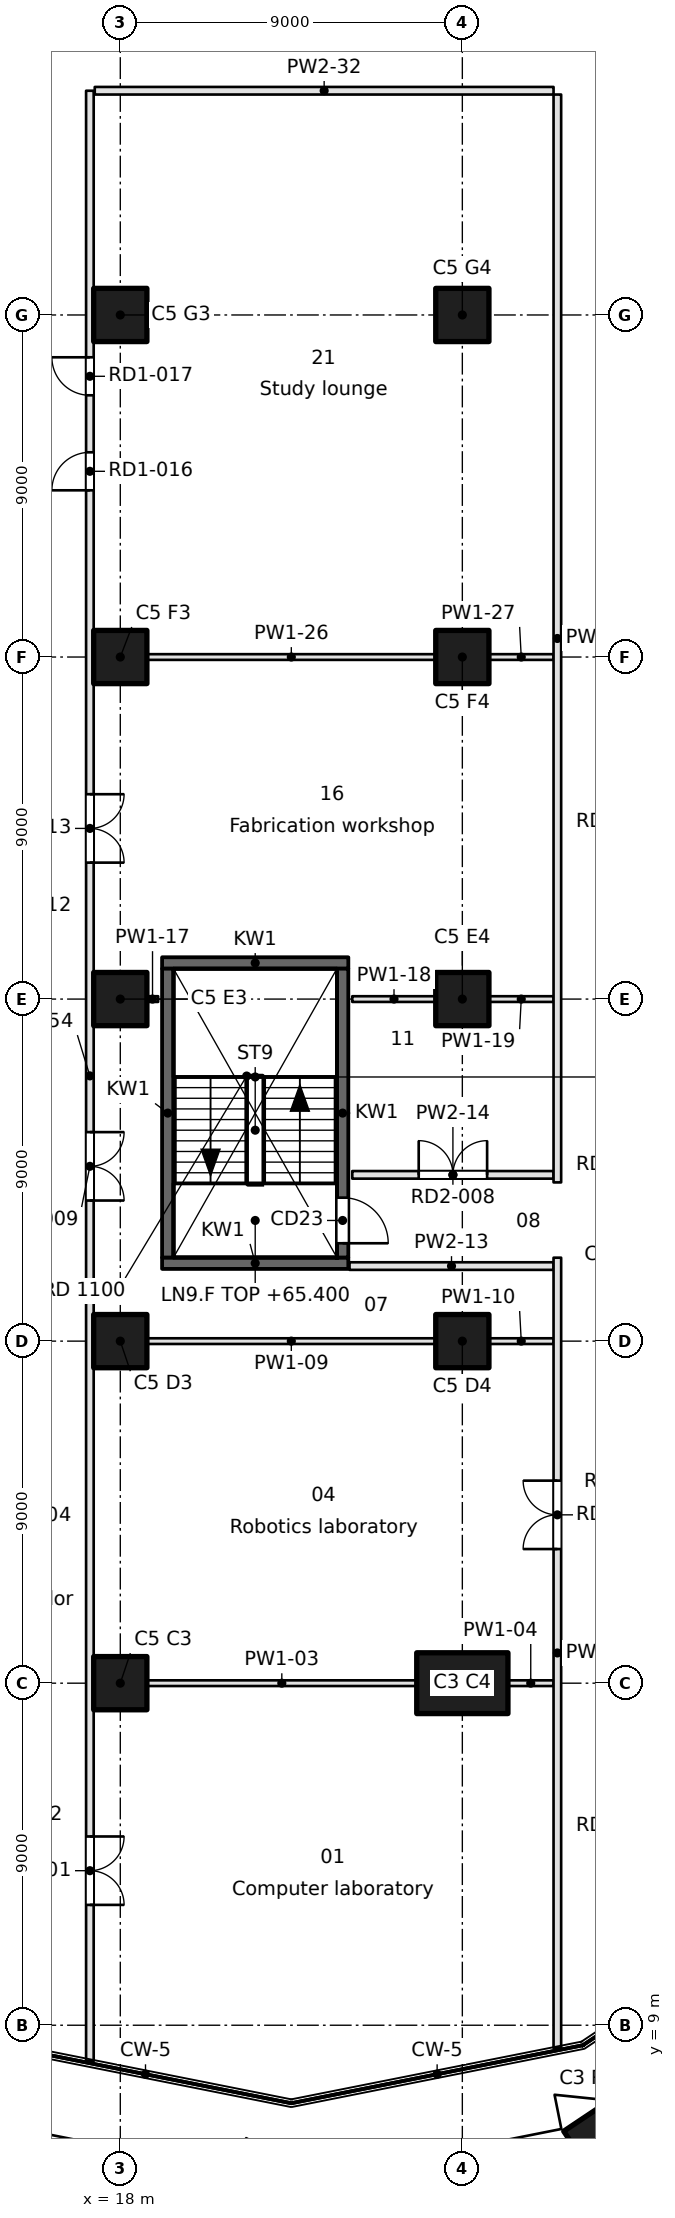
"""IFC4 building model, lengths in metres.
Left out: names, types, materials, properties, quantities, classifications, styles, units other than length and angle.
Written with IfcOpenShell. Run it as: python <this file> out.ifc"""

import sys

from ifc_helpers import new_model, si_unit, direction, frame, frame_2d, origin, origin_2d, place, context, subcontext, project, spatial, rectangle, extrude, element, fill, save


model = new_model("IFC4")
c1 = context("Model", 3, precision=1e-05, world=origin(), true_north=direction((0.0, 1.0)))
c2 = subcontext(c1, "Body", "Model", "MODEL_VIEW")
j1 = project(units=[si_unit("LENGTHUNIT", "METRE"), si_unit("PLANEANGLEUNIT", "RADIAN")], contexts=[c1])
p1 = place(None, origin())
s1 = spatial("IfcSite", under=j1, at=p1, CompositionType="ELEMENT")
p2 = place(p1, origin())
s2 = spatial("IfcBuilding", under=s1, at=p2, CompositionType="ELEMENT")
p3 = place(p2, frame((0.0, 0.0, 65.4)))
s3 = spatial("IfcBuildingStorey", under=s2, at=p3, CompositionType="ELEMENT", Elevation=65.4)
p4 = place(p3, frame((31.11, 6.213, 0.0), z_axis=(0.0, 0.0, 1.0), x_axis=(0.831469612303, 0.55557023302, 0.0)))
e1 = element("IfcColumn", 1, at=p4, inside=s3, PredefinedType="COLUMN", context=c2, shape_type="SweptSolid", body=[
    extrude(rectangle(XDim=2.4, YDim=1.6, at=origin_2d()), origin(), (0.0, 0.0, 1.0), 3.7),
])
for number, where, z_axis, x_axis in (
    (2, (18.0, 18.0, 0.0), (0.0, 0.0, 1.0), (1.0, 0.0, 0.0)),
    (3, (18.0, 27.0, 0.0), (0.0, 0.0, 1.0), (1.0, 0.0, 0.0)),
    (4, (18.0, 36.0, 0.0), (0.0, 0.0, 1.0), (1.0, 0.0, 0.0)),
    (5, (18.0, 45.0, 0.0), (0.0, 0.0, 1.0), (1.0, 0.0, 0.0)),
    (6, (18.0, 54.0, 0.0), (0.0, 0.0, 1.0), (1.0, 0.0, 0.0)),
):
    element("IfcColumn", number, at=place(p3, frame(where, z_axis=z_axis, x_axis=x_axis)), inside=s3, PredefinedType="COLUMN", context=c2, shape_type="SweptSolid", body=[
        extrude(rectangle(XDim=1.4, YDim=1.4, at=origin_2d()), origin(), (0.0, 0.0, 1.0), 3.7),
    ])
p5 = place(p3, frame((27.0, 18.0, 0.0), z_axis=(0.0, 0.0, 1.0), x_axis=(1.0, 0.0, 0.0)))
e7 = element("IfcColumn", 7, at=p5, inside=s3, PredefinedType="COLUMN", context=c2, shape_type="SweptSolid", body=[
    extrude(rectangle(XDim=2.4, YDim=1.6, at=origin_2d()), origin(), (0.0, 0.0, 1.0), 3.7),
])
for number, where, z_axis, x_axis in (
    (8, (27.0, 27.0, 0.0), (0.0, 0.0, 1.0), (1.0, 0.0, 0.0)),
    (9, (27.0, 36.0, 0.0), (0.0, 0.0, 1.0), (1.0, 0.0, 0.0)),
    (10, (27.0, 45.0, 0.0), (0.0, 0.0, 1.0), (1.0, 0.0, 0.0)),
    (11, (27.0, 54.0, 0.0), (0.0, 0.0, 1.0), (1.0, 0.0, 0.0)),
):
    element("IfcColumn", number, at=place(p3, frame(where, z_axis=z_axis, x_axis=x_axis)), inside=s3, PredefinedType="COLUMN", context=c2, shape_type="SweptSolid", body=[
        extrude(rectangle(XDim=1.4, YDim=1.4, at=origin_2d()), origin(), (0.0, 0.0, 1.0), 3.7),
    ])
for number, where, z_axis, x_axis in (
    (12, (19.1, 29.05, -0.4), (0.0, 0.0, 1.0), (1.0, 0.0, 0.0)),
    (13, (19.1, 36.95, -0.4), (0.0, 0.0, 1.0), (1.0, 0.0, 0.0)),
):
    element("IfcWall", number, at=place(p3, frame(where, z_axis=z_axis, x_axis=x_axis)), inside=s3, PredefinedType="SOLIDWALL", context=c2, shape_type="SweptSolid", body=[
        extrude(rectangle(XDim=4.9, YDim=0.3, at=frame_2d((2.45, 0.0))), origin(), (0.0, 0.0, 1.0), 3.7),
    ])
p6 = place(p3, frame((19.25, 29.2, -0.4), z_axis=(0.0, 0.0, 1.0), x_axis=(0.0, 1.0, 0.0)))
e14 = element("IfcWall", 14, at=p6, inside=s3, PredefinedType="SOLIDWALL", context=c2, shape_type="SweptSolid", body=[
    extrude(rectangle(XDim=7.6, YDim=0.3, at=frame_2d((3.8, 0.0))), origin(), (0.0, 0.0, 1.0), 3.7),
])
p7 = place(p3, frame((23.85, 29.2, -0.4), z_axis=(0.0, 0.0, 1.0), x_axis=(0.0, 1.0, 0.0)))
e15 = element("IfcWall", 15, at=p7, inside=s3, PredefinedType="SOLIDWALL", context=c2, shape_type="SweptSolid", body=[
    extrude(rectangle(XDim=7.6, YDim=0.3, at=frame_2d((3.8, 0.0))), origin(), (0.0, 0.0, 1.0), 3.7),
])
p8 = place(p7, frame((0.375, 0.0, 0.4)))
e16 = element("IfcOpeningElement", 16, at=p8, cuts=e15, PredefinedType="OPENING", context=c2, shape_type="SweptSolid", body=[
    extrude(rectangle(XDim=1.2, YDim=2.1, at=frame_2d((0.6, 1.05))), frame((0.0, 0.15, 0.0), z_axis=(0.0, -1.0, 0.0), x_axis=(1.0, 0.0, 0.0)), (0.0, 0.0, 1.0), 0.3),
])
p9 = place(p3, frame((18.7, 18.0, 0.0), z_axis=(0.0, 0.0, 1.0), x_axis=(1.0, 0.0, 0.0)))
e17 = element("IfcWall", 17, at=p9, inside=s3, PredefinedType="PARTITIONING", context=c2, shape_type="SweptSolid", body=[
    extrude(rectangle(XDim=7.1, YDim=0.15, at=frame_2d((3.55, 0.0))), origin(), (0.0, 0.0, 1.0), 3.3),
])
p10 = place(p3, frame((28.2, 18.0, 0.0), z_axis=(0.0, 0.0, 1.0), x_axis=(1.0, 0.0, 0.0)))
e18 = element("IfcWall", 18, at=p10, inside=s3, PredefinedType="PARTITIONING", context=c2, shape_type="SweptSolid", body=[
    extrude(rectangle(XDim=1.2, YDim=0.15, at=frame_2d((0.6, 0.0))), origin(), (0.0, 0.0, 1.0), 3.3),
])
p11 = place(p3, frame((18.7, 27.0, 0.0), z_axis=(0.0, 0.0, 1.0), x_axis=(1.0, 0.0, 0.0)))
e19 = element("IfcWall", 19, at=p11, inside=s3, PredefinedType="PARTITIONING", context=c2, shape_type="SweptSolid", body=[
    extrude(rectangle(XDim=7.6, YDim=0.15, at=frame_2d((3.8, 0.0))), origin(), (0.0, 0.0, 1.0), 3.3),
])
p12 = place(p3, frame((27.7, 27.0, 0.0), z_axis=(0.0, 0.0, 1.0), x_axis=(1.0, 0.0, 0.0)))
e20 = element("IfcWall", 20, at=p12, inside=s3, PredefinedType="PARTITIONING", context=c2, shape_type="SweptSolid", body=[
    extrude(rectangle(XDim=1.7, YDim=0.15, at=frame_2d((0.85, 0.0))), origin(), (0.0, 0.0, 1.0), 3.3),
])
p13 = place(p3, frame((29.4, 28.975, 0.0), z_axis=(0.0, 0.0, 1.0), x_axis=(-1.0, 0.0, 0.0)))
e21 = element("IfcWall", 21, at=p13, inside=s3, PredefinedType="PARTITIONING", context=c2, shape_type="SweptSolid", body=[
    extrude(rectangle(XDim=5.37, YDim=0.2, at=frame_2d((2.685, 0.0))), origin(), (0.0, 0.0, 1.0), 3.3),
])
p14 = place(p3, frame((24.104, 31.375, 0.0), z_axis=(0.0, 0.0, 1.0), x_axis=(1.0, 0.0, 0.0)))
e22 = element("IfcWall", 22, at=p14, inside=s3, PredefinedType="PARTITIONING", context=c2, shape_type="SweptSolid", body=[
    extrude(rectangle(XDim=5.296, YDim=0.2, at=frame_2d((2.648, 0.0))), origin(), (0.0, 0.0, 1.0), 3.3),
])
p15 = place(p14, frame((1.748, 0.0, 0.0)))
e23 = element("IfcOpeningElement", 23, at=p15, cuts=e22, PredefinedType="OPENING", context=c2, shape_type="SweptSolid", body=[
    extrude(rectangle(XDim=1.8, YDim=2.1, at=frame_2d((0.9, 1.05))), frame((0.0, 0.1, 0.0), z_axis=(0.0, -1.0, 0.0), x_axis=(1.0, 0.0, 0.0)), (0.0, 0.0, 1.0), 0.2),
])
p16 = place(p3, frame((18.7, 36.0, 0.0), z_axis=(0.0, 0.0, 1.0), x_axis=(1.0, 0.0, 0.0)))
e24 = element("IfcWall", 24, at=p16, inside=s3, PredefinedType="PARTITIONING", context=c2, shape_type="SweptSolid", body=[
    extrude(rectangle(XDim=0.296, YDim=0.15, at=frame_2d((0.148, 0.0))), origin(), (0.0, 0.0, 1.0), 3.3),
])
p17 = place(p3, frame((24.104, 36.0, 0.0), z_axis=(0.0, 0.0, 1.0), x_axis=(1.0, 0.0, 0.0)))
e25 = element("IfcWall", 25, at=p17, inside=s3, PredefinedType="PARTITIONING", context=c2, shape_type="SweptSolid", body=[
    extrude(rectangle(XDim=2.196, YDim=0.15, at=frame_2d((1.098, 0.0))), origin(), (0.0, 0.0, 1.0), 3.3),
])
p18 = place(p3, frame((27.7, 36.0, 0.0), z_axis=(0.0, 0.0, 1.0), x_axis=(1.0, 0.0, 0.0)))
e26 = element("IfcWall", 26, at=p18, inside=s3, PredefinedType="PARTITIONING", context=c2, shape_type="SweptSolid", body=[
    extrude(rectangle(XDim=1.7, YDim=0.15, at=frame_2d((0.85, 0.0))), origin(), (0.0, 0.0, 1.0), 3.3),
])
p19 = place(p3, frame((18.7, 45.0, 0.0), z_axis=(0.0, 0.0, 1.0), x_axis=(1.0, 0.0, 0.0)))
e27 = element("IfcWall", 27, at=p19, inside=s3, PredefinedType="PARTITIONING", context=c2, shape_type="SweptSolid", body=[
    extrude(rectangle(XDim=7.6, YDim=0.15, at=frame_2d((3.8, 0.0))), origin(), (0.0, 0.0, 1.0), 3.3),
])
p20 = place(p3, frame((27.7, 45.0, 0.0), z_axis=(0.0, 0.0, 1.0), x_axis=(1.0, 0.0, 0.0)))
e28 = element("IfcWall", 28, at=p20, inside=s3, PredefinedType="PARTITIONING", context=c2, shape_type="SweptSolid", body=[
    extrude(rectangle(XDim=1.7, YDim=0.15, at=frame_2d((0.85, 0.0))), origin(), (0.0, 0.0, 1.0), 3.3),
])
p21 = place(p3, frame((29.4, 59.9, 0.0), z_axis=(0.0, 0.0, 1.0), x_axis=(-1.0, 0.0, 0.0)))
e29 = element("IfcWall", 29, at=p21, inside=s3, PredefinedType="PARTITIONING", context=c2, shape_type="SweptSolid", body=[
    extrude(rectangle(XDim=12.072, YDim=0.2, at=frame_2d((6.036, 0.0))), origin(), (0.0, 0.0, 1.0), 3.3),
])
p22 = place(p3, frame((17.2, 59.9, 0.0), z_axis=(0.0, 0.0, 1.0), x_axis=(0.0, -1.0, 0.0)))
e30 = element("IfcWall", 30, at=p22, inside=s3, PredefinedType="PARTITIONING", context=c2, shape_type="SweptSolid", body=[
    extrude(rectangle(XDim=51.843, YDim=0.2, at=frame_2d((25.921, 0.0))), origin(), (0.0, 0.0, 1.0), 3.3),
])
p23 = place(p22, frame((45.934, 0.0, 0.0)))
e31 = element("IfcOpeningElement", 31, at=p23, cuts=e30, PredefinedType="OPENING", context=c2, shape_type="SweptSolid", body=[
    extrude(rectangle(XDim=1.8, YDim=2.1, at=frame_2d((0.9, 1.05))), frame((0.0, 0.1, 0.0), z_axis=(0.0, -1.0, 0.0), x_axis=(1.0, 0.0, 0.0)), (0.0, 0.0, 1.0), 0.2),
])
p24 = place(p22, frame((27.401, 0.0, 0.0)))
e32 = element("IfcOpeningElement", 32, at=p24, cuts=e30, PredefinedType="OPENING", context=c2, shape_type="SweptSolid", body=[
    extrude(rectangle(XDim=1.8, YDim=2.1, at=frame_2d((0.9, 1.05))), frame((0.0, 0.1, 0.0), z_axis=(0.0, -1.0, 0.0), x_axis=(1.0, 0.0, 0.0)), (0.0, 0.0, 1.0), 0.2),
])
p25 = place(p22, frame((18.51, 0.0, 0.0)))
e33 = element("IfcOpeningElement", 33, at=p25, cuts=e30, PredefinedType="OPENING", context=c2, shape_type="SweptSolid", body=[
    extrude(rectangle(XDim=1.8, YDim=2.1, at=frame_2d((0.9, 1.05))), frame((0.0, 0.1, 0.0), z_axis=(0.0, -1.0, 0.0), x_axis=(1.0, 0.0, 0.0)), (0.0, 0.0, 1.0), 0.2),
])
p26 = place(p22, frame((9.513, 0.0, 0.0)))
e34 = element("IfcOpeningElement", 34, at=p26, cuts=e30, PredefinedType="OPENING", context=c2, shape_type="SweptSolid", body=[
    extrude(rectangle(XDim=1.0, YDim=2.1, at=frame_2d((0.5, 1.05))), frame((0.0, 0.1, 0.0), z_axis=(0.0, -1.0, 0.0), x_axis=(1.0, 0.0, 0.0)), (0.0, 0.0, 1.0), 0.2),
])
p27 = place(p22, frame((7.013, 0.0, 0.0)))
e35 = element("IfcOpeningElement", 35, at=p27, cuts=e30, PredefinedType="OPENING", context=c2, shape_type="SweptSolid", body=[
    extrude(rectangle(XDim=1.0, YDim=2.1, at=frame_2d((0.5, 1.05))), frame((0.0, 0.1, 0.0), z_axis=(0.0, -1.0, 0.0), x_axis=(1.0, 0.0, 0.0)), (0.0, 0.0, 1.0), 0.2),
])
p28 = place(p3, frame((29.5, 8.396, 0.0), z_axis=(0.0, 0.0, 1.0), x_axis=(0.0, 1.0, 0.0)))
e36 = element("IfcWall", 36, at=p28, inside=s3, PredefinedType="PARTITIONING", context=c2, shape_type="SweptSolid", body=[
    extrude(rectangle(XDim=20.8, YDim=0.2, at=frame_2d((10.4, 0.0))), origin(), (0.0, 0.0, 1.0), 3.3),
])
p29 = place(p28, frame((13.134, 0.0, 0.0)))
e37 = element("IfcOpeningElement", 37, at=p29, cuts=e36, PredefinedType="OPENING", context=c2, shape_type="SweptSolid", body=[
    extrude(rectangle(XDim=1.8, YDim=2.1, at=frame_2d((0.9, 1.05))), frame((0.0, 0.1, 0.0), z_axis=(0.0, -1.0, 0.0), x_axis=(1.0, 0.0, 0.0)), (0.0, 0.0, 1.0), 0.2),
])
p30 = place(p3, frame((29.5, 31.176, 0.0), z_axis=(0.0, 0.0, 1.0), x_axis=(0.0, 1.0, 0.0)))
e38 = element("IfcWall", 38, at=p30, inside=s3, PredefinedType="PARTITIONING", context=c2, shape_type="SweptSolid", body=[
    extrude(rectangle(XDim=28.624, YDim=0.2, at=frame_2d((14.312, 0.0))), origin(), (0.0, 0.0, 1.0), 3.3),
])
p31 = place(p8, frame((1.2, 0.0, 0.0), z_axis=(0.0, 0.0, 1.0), x_axis=(-1.0, 0.0, 0.0)))
e39 = element("IfcDoor", 39, at=p31, inside=s3, OperationType="SINGLE_SWING_RIGHT", PredefinedType="DOOR", context=c2, shape_type="SweptSolid", body=[
    extrude(rectangle(XDim=1.2, YDim=2.1, at=frame_2d((0.6, 1.05))), frame((0.0, 0.025, 0.0), z_axis=(0.0, -1.0, 0.0), x_axis=(1.0, 0.0, 0.0)), (0.0, 0.0, 1.0), 0.05),
])
fill(e16, e39)
p32 = place(p23, origin())
e40 = element("IfcDoor", 40, at=p32, inside=s3, OperationType="DOUBLE_DOOR_SINGLE_SWING", PredefinedType="DOOR", context=c2, shape_type="SweptSolid", body=[
    extrude(rectangle(XDim=1.8, YDim=2.1, at=frame_2d((0.9, 1.05))), frame((0.0, 0.025, 0.0), z_axis=(0.0, -1.0, 0.0), x_axis=(1.0, 0.0, 0.0)), (0.0, 0.0, 1.0), 0.05),
])
fill(e31, e40)
p33 = place(p29, origin())
e41 = element("IfcDoor", 41, at=p33, inside=s3, OperationType="DOUBLE_DOOR_SINGLE_SWING", PredefinedType="DOOR", context=c2, shape_type="SweptSolid", body=[
    extrude(rectangle(XDim=1.8, YDim=2.1, at=frame_2d((0.9, 1.05))), frame((0.0, 0.025, 0.0), z_axis=(0.0, -1.0, 0.0), x_axis=(1.0, 0.0, 0.0)), (0.0, 0.0, 1.0), 0.05),
])
fill(e37, e41)
p34 = place(p15, origin())
e42 = element("IfcDoor", 42, at=p34, inside=s3, OperationType="DOUBLE_DOOR_SINGLE_SWING", PredefinedType="DOOR", context=c2, shape_type="SweptSolid", body=[
    extrude(rectangle(XDim=1.8, YDim=2.1, at=frame_2d((0.9, 1.05))), frame((0.0, 0.025, 0.0), z_axis=(0.0, -1.0, 0.0), x_axis=(1.0, 0.0, 0.0)), (0.0, 0.0, 1.0), 0.05),
])
fill(e23, e42)
p35 = place(p24, origin())
e43 = element("IfcDoor", 43, at=p35, inside=s3, OperationType="DOUBLE_DOOR_SINGLE_SWING", PredefinedType="DOOR", context=c2, shape_type="SweptSolid", body=[
    extrude(rectangle(XDim=1.8, YDim=2.1, at=frame_2d((0.9, 1.05))), frame((0.0, 0.025, 0.0), z_axis=(0.0, -1.0, 0.0), x_axis=(1.0, 0.0, 0.0)), (0.0, 0.0, 1.0), 0.05),
])
fill(e32, e43)
p36 = place(p25, origin())
e44 = element("IfcDoor", 44, at=p36, inside=s3, OperationType="DOUBLE_DOOR_SINGLE_SWING", PredefinedType="DOOR", context=c2, shape_type="SweptSolid", body=[
    extrude(rectangle(XDim=1.8, YDim=2.1, at=frame_2d((0.9, 1.05))), frame((0.0, 0.025, 0.0), z_axis=(0.0, -1.0, 0.0), x_axis=(1.0, 0.0, 0.0)), (0.0, 0.0, 1.0), 0.05),
])
fill(e33, e44)
p37 = place(p26, frame((1.0, 0.0, 0.0), z_axis=(0.0, 0.0, 1.0), x_axis=(-1.0, 0.0, 0.0)))
e45 = element("IfcDoor", 45, at=p37, inside=s3, OperationType="SINGLE_SWING_LEFT", PredefinedType="DOOR", context=c2, shape_type="SweptSolid", body=[
    extrude(rectangle(XDim=1.0, YDim=2.1, at=frame_2d((0.5, 1.05))), frame((0.0, 0.025, 0.0), z_axis=(0.0, -1.0, 0.0), x_axis=(1.0, 0.0, 0.0)), (0.0, 0.0, 1.0), 0.05),
])
fill(e34, e45)
p38 = place(p27, frame((1.0, 0.0, 0.0), z_axis=(0.0, 0.0, 1.0), x_axis=(-1.0, 0.0, 0.0)))
e46 = element("IfcDoor", 46, at=p38, inside=s3, OperationType="SINGLE_SWING_RIGHT", PredefinedType="DOOR", context=c2, shape_type="SweptSolid", body=[
    extrude(rectangle(XDim=1.0, YDim=2.1, at=frame_2d((0.5, 1.05))), frame((0.0, 0.025, 0.0), z_axis=(0.0, -1.0, 0.0), x_axis=(1.0, 0.0, 0.0)), (0.0, 0.0, 1.0), 0.05),
])
fill(e35, e46)
save(model, sys.argv[1])
